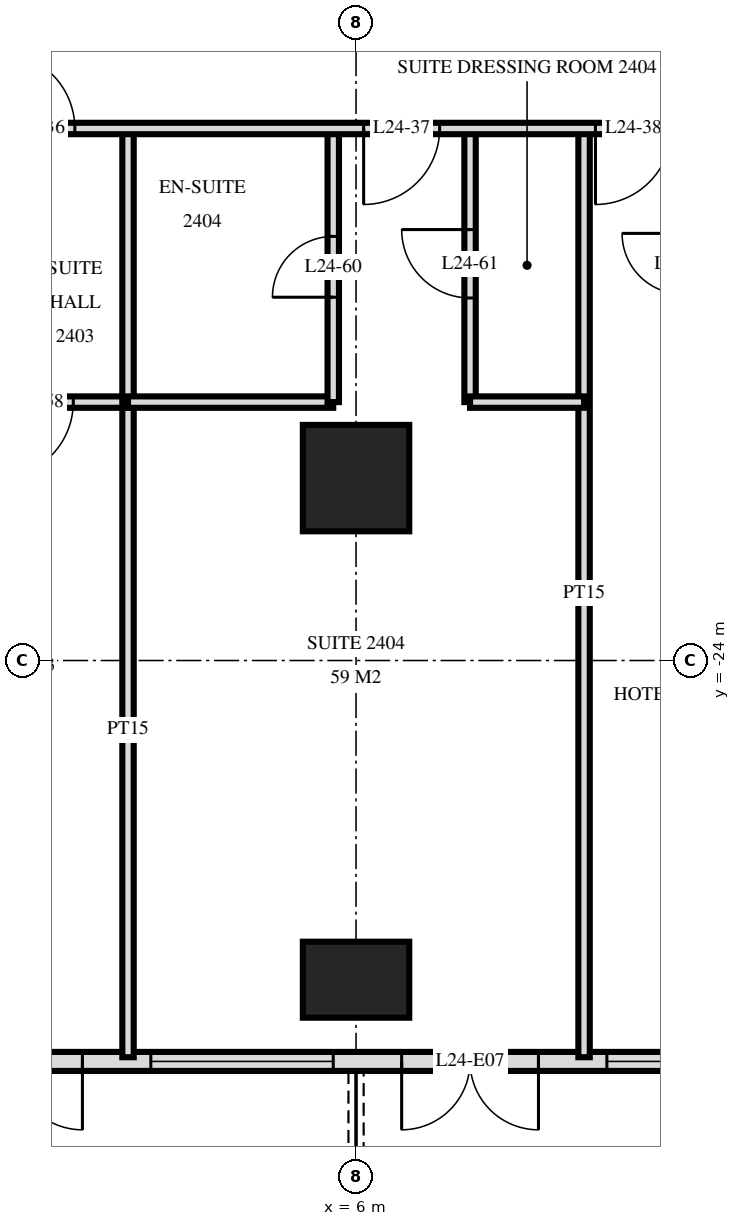
"""IFC4 building model, lengths in metres.
Left out: names, types, materials, properties, quantities, classifications, styles, units other than length and angle.
Written with IfcOpenShell. Run it as: python <this file> out.ifc"""

import sys

from ifc_helpers import new_model, si_unit, direction, frame, frame_2d, origin, origin_2d, place, context, subcontext, project, spatial, rectangle, extrude, element, fill, save


model = new_model("IFC4")
c1 = context("Model", 3, precision=1e-05, world=origin(), true_north=direction((0.0, 1.0)))
c2 = subcontext(c1, "Body", "Model", "MODEL_VIEW")
j1 = project(units=[si_unit("LENGTHUNIT", "METRE"), si_unit("PLANEANGLEUNIT", "RADIAN")], contexts=[c1])
p1 = place(None, origin())
s1 = spatial("IfcSite", under=j1, at=p1, CompositionType="ELEMENT")
p2 = place(p1, origin())
s2 = spatial("IfcBuilding", under=s1, at=p2, CompositionType="ELEMENT")
p3 = place(p2, frame((0.0, 0.0, 96.0)))
s3 = spatial("IfcBuildingStorey", under=s2, at=p3, CompositionType="ELEMENT", Elevation=96.0)
p4 = place(p3, frame((6.0, -28.2, 0.0), z_axis=(0.0, 0.0, 1.0), x_axis=(1.0, 0.0, 0.0)))
e1 = element("IfcColumn", 1, at=p4, inside=s3, PredefinedType="COLUMN", context=c2, shape_type="SweptSolid", body=[
    extrude(rectangle(XDim=1.4, YDim=1.0, at=origin_2d()), origin(), (0.0, 0.0, 1.0), 3.6),
])
p5 = place(p3, frame((6.0, -21.6, 0.0), z_axis=(0.0, 0.0, 1.0), x_axis=(1.0, 0.0, 0.0)))
e2 = element("IfcColumn", 2, at=p5, inside=s3, PredefinedType="COLUMN", context=c2, shape_type="SweptSolid", body=[
    extrude(rectangle(XDim=1.4, YDim=1.4, at=origin_2d()), origin(), (0.0, 0.0, 1.0), 3.6),
])
p6 = place(p3, frame((-28.775, -29.275, 0.0), z_axis=(0.0, 0.0, 1.0), x_axis=(1.0, 0.0, 0.0)))
e3 = element("IfcWall", 3, at=p6, inside=s3, PredefinedType="SOLIDWALL", context=c2, shape_type="SweptSolid", body=[
    extrude(rectangle(XDim=57.551, YDim=0.25, at=frame_2d((28.775, 0.0))), origin(), (0.0, 0.0, 1.0), 3.32),
])
p7 = place(p6, frame((0.575, 0.0, 0.0)))
e4 = element("IfcOpeningElement", 4, at=p7, cuts=e3, PredefinedType="OPENING", context=c2, shape_type="SweptSolid", body=[
    extrude(rectangle(XDim=1.8, YDim=2.4, at=frame_2d((0.9, 1.2))), frame((0.0, 0.135, 0.0), z_axis=(0.0, -1.0, 0.0), x_axis=(1.0, 0.0, 0.0)), (0.0, 0.0, 1.0), 0.27),
])
p8 = place(p6, frame((5.075, 0.0, 0.3)))
e5 = element("IfcOpeningElement", 5, at=p8, cuts=e3, PredefinedType="OPENING", context=c2, shape_type="SweptSolid", body=[
    extrude(rectangle(XDim=2.4, YDim=2.1, at=frame_2d((1.2, 1.05))), frame((0.0, 0.135, 0.0), z_axis=(0.0, -1.0, 0.0), x_axis=(1.0, 0.0, 0.0)), (0.0, 0.0, 1.0), 0.27),
])
p9 = place(p6, frame((8.375, 0.0, 0.0)))
e6 = element("IfcOpeningElement", 6, at=p9, cuts=e3, PredefinedType="OPENING", context=c2, shape_type="SweptSolid", body=[
    extrude(rectangle(XDim=1.8, YDim=2.4, at=frame_2d((0.9, 1.2))), frame((0.0, 0.135, 0.0), z_axis=(0.0, -1.0, 0.0), x_axis=(1.0, 0.0, 0.0)), (0.0, 0.0, 1.0), 0.27),
])
p10 = place(p6, frame((11.375, 0.0, 0.0)))
e7 = element("IfcOpeningElement", 7, at=p10, cuts=e3, PredefinedType="OPENING", context=c2, shape_type="SweptSolid", body=[
    extrude(rectangle(XDim=1.8, YDim=2.4, at=frame_2d((0.9, 1.2))), frame((0.0, 0.135, 0.0), z_axis=(0.0, -1.0, 0.0), x_axis=(1.0, 0.0, 0.0)), (0.0, 0.0, 1.0), 0.27),
])
p11 = place(p6, frame((14.075, 0.0, 0.3)))
e8 = element("IfcOpeningElement", 8, at=p11, cuts=e3, PredefinedType="OPENING", context=c2, shape_type="SweptSolid", body=[
    extrude(rectangle(XDim=2.4, YDim=2.1, at=frame_2d((1.2, 1.05))), frame((0.0, 0.135, 0.0), z_axis=(0.0, -1.0, 0.0), x_axis=(1.0, 0.0, 0.0)), (0.0, 0.0, 1.0), 0.27),
])
p12 = place(p6, frame((17.375, 0.0, 0.0)))
e9 = element("IfcOpeningElement", 9, at=p12, cuts=e3, PredefinedType="OPENING", context=c2, shape_type="SweptSolid", body=[
    extrude(rectangle(XDim=1.8, YDim=2.4, at=frame_2d((0.9, 1.2))), frame((0.0, 0.135, 0.0), z_axis=(0.0, -1.0, 0.0), x_axis=(1.0, 0.0, 0.0)), (0.0, 0.0, 1.0), 0.27),
])
p13 = place(p6, frame((20.075, 0.0, 0.3)))
e10 = element("IfcOpeningElement", 10, at=p13, cuts=e3, PredefinedType="OPENING", context=c2, shape_type="SweptSolid", body=[
    extrude(rectangle(XDim=2.4, YDim=2.1, at=frame_2d((1.2, 1.05))), frame((0.0, 0.135, 0.0), z_axis=(0.0, -1.0, 0.0), x_axis=(1.0, 0.0, 0.0)), (0.0, 0.0, 1.0), 0.27),
])
p14 = place(p6, frame((23.075, 0.0, 0.3)))
e11 = element("IfcOpeningElement", 11, at=p14, cuts=e3, PredefinedType="OPENING", context=c2, shape_type="SweptSolid", body=[
    extrude(rectangle(XDim=2.4, YDim=2.1, at=frame_2d((1.2, 1.05))), frame((0.0, 0.135, 0.0), z_axis=(0.0, -1.0, 0.0), x_axis=(1.0, 0.0, 0.0)), (0.0, 0.0, 1.0), 0.27),
])
p15 = place(p6, frame((26.375, 0.0, 0.0)))
e12 = element("IfcOpeningElement", 12, at=p15, cuts=e3, PredefinedType="OPENING", context=c2, shape_type="SweptSolid", body=[
    extrude(rectangle(XDim=1.8, YDim=2.4, at=frame_2d((0.9, 1.2))), frame((0.0, 0.135, 0.0), z_axis=(0.0, -1.0, 0.0), x_axis=(1.0, 0.0, 0.0)), (0.0, 0.0, 1.0), 0.27),
])
p16 = place(p6, frame((29.375, 0.0, 0.0)))
e13 = element("IfcOpeningElement", 13, at=p16, cuts=e3, PredefinedType="OPENING", context=c2, shape_type="SweptSolid", body=[
    extrude(rectangle(XDim=1.8, YDim=2.4, at=frame_2d((0.9, 1.2))), frame((0.0, 0.135, 0.0), z_axis=(0.0, -1.0, 0.0), x_axis=(1.0, 0.0, 0.0)), (0.0, 0.0, 1.0), 0.27),
])
p17 = place(p6, frame((32.075, 0.0, 0.3)))
e14 = element("IfcOpeningElement", 14, at=p17, cuts=e3, PredefinedType="OPENING", context=c2, shape_type="SweptSolid", body=[
    extrude(rectangle(XDim=2.4, YDim=2.1, at=frame_2d((1.2, 1.05))), frame((0.0, 0.135, 0.0), z_axis=(0.0, -1.0, 0.0), x_axis=(1.0, 0.0, 0.0)), (0.0, 0.0, 1.0), 0.27),
])
p18 = place(p6, frame((35.375, 0.0, 0.0)))
e15 = element("IfcOpeningElement", 15, at=p18, cuts=e3, PredefinedType="OPENING", context=c2, shape_type="SweptSolid", body=[
    extrude(rectangle(XDim=1.8, YDim=2.4, at=frame_2d((0.9, 1.2))), frame((0.0, 0.135, 0.0), z_axis=(0.0, -1.0, 0.0), x_axis=(1.0, 0.0, 0.0)), (0.0, 0.0, 1.0), 0.27),
])
p19 = place(p6, frame((38.075, 0.0, 0.3)))
e16 = element("IfcOpeningElement", 16, at=p19, cuts=e3, PredefinedType="OPENING", context=c2, shape_type="SweptSolid", body=[
    extrude(rectangle(XDim=2.4, YDim=2.1, at=frame_2d((1.2, 1.05))), frame((0.0, 0.135, 0.0), z_axis=(0.0, -1.0, 0.0), x_axis=(1.0, 0.0, 0.0)), (0.0, 0.0, 1.0), 0.27),
])
p20 = place(p6, frame((41.075, 0.0, 0.3)))
e17 = element("IfcOpeningElement", 17, at=p20, cuts=e3, PredefinedType="OPENING", context=c2, shape_type="SweptSolid", body=[
    extrude(rectangle(XDim=2.4, YDim=2.1, at=frame_2d((1.2, 1.05))), frame((0.0, 0.135, 0.0), z_axis=(0.0, -1.0, 0.0), x_axis=(1.0, 0.0, 0.0)), (0.0, 0.0, 1.0), 0.27),
])
p21 = place(p6, frame((44.375, 0.0, 0.0)))
e18 = element("IfcOpeningElement", 18, at=p21, cuts=e3, PredefinedType="OPENING", context=c2, shape_type="SweptSolid", body=[
    extrude(rectangle(XDim=1.8, YDim=2.4, at=frame_2d((0.9, 1.2))), frame((0.0, 0.135, 0.0), z_axis=(0.0, -1.0, 0.0), x_axis=(1.0, 0.0, 0.0)), (0.0, 0.0, 1.0), 0.27),
])
p22 = place(p6, frame((47.075, 0.0, 0.3)))
e19 = element("IfcOpeningElement", 19, at=p22, cuts=e3, PredefinedType="OPENING", context=c2, shape_type="SweptSolid", body=[
    extrude(rectangle(XDim=2.4, YDim=2.1, at=frame_2d((1.2, 1.05))), frame((0.0, 0.135, 0.0), z_axis=(0.0, -1.0, 0.0), x_axis=(1.0, 0.0, 0.0)), (0.0, 0.0, 1.0), 0.27),
])
p23 = place(p6, frame((50.375, 0.0, 0.0)))
e20 = element("IfcOpeningElement", 20, at=p23, cuts=e3, PredefinedType="OPENING", context=c2, shape_type="SweptSolid", body=[
    extrude(rectangle(XDim=1.8, YDim=2.4, at=frame_2d((0.9, 1.2))), frame((0.0, 0.135, 0.0), z_axis=(0.0, -1.0, 0.0), x_axis=(1.0, 0.0, 0.0)), (0.0, 0.0, 1.0), 0.27),
])
p24 = place(p6, frame((53.375, 0.0, 0.0)))
e21 = element("IfcOpeningElement", 21, at=p24, cuts=e3, PredefinedType="OPENING", context=c2, shape_type="SweptSolid", body=[
    extrude(rectangle(XDim=1.8, YDim=2.4, at=frame_2d((0.9, 1.2))), frame((0.0, 0.135, 0.0), z_axis=(0.0, -1.0, 0.0), x_axis=(1.0, 0.0, 0.0)), (0.0, 0.0, 1.0), 0.27),
])
p25 = place(p3, frame((9.0, -29.22, 0.0), z_axis=(0.0, 0.0, 1.0), x_axis=(0.0, 1.0, 0.0)))
e22 = element("IfcWall", 22, at=p25, inside=s3, PredefinedType="PARTITIONING", context=c2, shape_type="SweptSolid", body=[
    extrude(rectangle(XDim=12.22, YDim=0.15, at=frame_2d((6.11, 0.0))), origin(), (0.0, 0.0, 1.0), 3.32),
])
p26 = place(p3, frame((7.5, -20.6, 0.0), z_axis=(0.0, 0.0, 1.0), x_axis=(0.0, 1.0, 0.0)))
e23 = element("IfcWall", 23, at=p26, inside=s3, PredefinedType="PARTITIONING", context=c2, shape_type="SweptSolid", body=[
    extrude(rectangle(XDim=3.6, YDim=0.15, at=frame_2d((1.8, 0.0))), origin(), (0.0, 0.0, 1.0), 3.32),
])
p27 = place(p26, frame((1.37, 0.0, 0.0)))
e24 = element("IfcOpeningElement", 24, at=p27, cuts=e23, PredefinedType="OPENING", context=c2, shape_type="SweptSolid", body=[
    extrude(rectangle(XDim=0.9, YDim=2.1, at=frame_2d((0.45, 1.05))), frame((0.0, 0.085, 0.0), z_axis=(0.0, -1.0, 0.0), x_axis=(1.0, 0.0, 0.0)), (0.0, 0.0, 1.0), 0.17),
])
p28 = place(p3, frame((5.7, -20.6, 0.0), z_axis=(0.0, 0.0, 1.0), x_axis=(0.0, 1.0, 0.0)))
e25 = element("IfcWall", 25, at=p28, inside=s3, PredefinedType="PARTITIONING", context=c2, shape_type="SweptSolid", body=[
    extrude(rectangle(XDim=3.6, YDim=0.15, at=frame_2d((1.8, 0.0))), origin(), (0.0, 0.0, 1.0), 3.32),
])
p29 = place(p28, frame((1.38, 0.0, 0.0)))
e26 = element("IfcOpeningElement", 26, at=p29, cuts=e25, PredefinedType="OPENING", context=c2, shape_type="SweptSolid", body=[
    extrude(rectangle(XDim=0.8, YDim=2.1, at=frame_2d((0.4, 1.05))), frame((0.0, 0.085, 0.0), z_axis=(0.0, -1.0, 0.0), x_axis=(1.0, 0.0, 0.0)), (0.0, 0.0, 1.0), 0.17),
])
p30 = place(p3, frame((3.0, -20.6, 0.0), z_axis=(0.0, 0.0, 1.0), x_axis=(0.0, 1.0, 0.0)))
e27 = element("IfcWall", 27, at=p30, inside=s3, PredefinedType="PARTITIONING", context=c2, shape_type="SweptSolid", body=[
    extrude(rectangle(XDim=3.6, YDim=0.15, at=frame_2d((1.8, 0.0))), origin(), (0.0, 0.0, 1.0), 3.32),
])
p31 = place(p3, frame((3.0, -29.22, 0.0), z_axis=(0.0, 0.0, 1.0), x_axis=(0.0, 1.0, 0.0)))
e28 = element("IfcWall", 28, at=p31, inside=s3, PredefinedType="PARTITIONING", context=c2, shape_type="SweptSolid", body=[
    extrude(rectangle(XDim=8.62, YDim=0.15, at=frame_2d((4.31, 0.0))), origin(), (0.0, 0.0, 1.0), 3.32),
])
p32 = place(p3, frame((0.6, -20.6, 0.0), z_axis=(0.0, 0.0, 1.0), x_axis=(1.0, 0.0, 0.0)))
e29 = element("IfcWall", 29, at=p32, inside=s3, PredefinedType="PARTITIONING", context=c2, shape_type="SweptSolid", body=[
    extrude(rectangle(XDim=2.4, YDim=0.15, at=frame_2d((1.2, 0.0))), origin(), (0.0, 0.0, 1.0), 3.32),
])
p33 = place(p32, frame((0.68, 0.0, 0.0)))
e30 = element("IfcOpeningElement", 30, at=p33, cuts=e29, PredefinedType="OPENING", context=c2, shape_type="SweptSolid", body=[
    extrude(rectangle(XDim=1.0, YDim=2.1, at=frame_2d((0.5, 1.05))), frame((0.0, 0.085, 0.0), z_axis=(0.0, -1.0, 0.0), x_axis=(1.0, 0.0, 0.0)), (0.0, 0.0, 1.0), 0.17),
])
p34 = place(p3, frame((3.0, -20.6, 0.0), z_axis=(0.0, 0.0, 1.0), x_axis=(1.0, 0.0, 0.0)))
e31 = element("IfcWall", 31, at=p34, inside=s3, PredefinedType="PARTITIONING", context=c2, shape_type="SweptSolid", body=[
    extrude(rectangle(XDim=2.7, YDim=0.15, at=frame_2d((1.35, 0.0))), origin(), (0.0, 0.0, 1.0), 3.32),
])
p35 = place(p3, frame((7.5, -20.6, 0.0), z_axis=(0.0, 0.0, 1.0), x_axis=(1.0, 0.0, 0.0)))
e32 = element("IfcWall", 32, at=p35, inside=s3, PredefinedType="PARTITIONING", context=c2, shape_type="SweptSolid", body=[
    extrude(rectangle(XDim=1.5, YDim=0.15, at=frame_2d((0.75, 0.0))), origin(), (0.0, 0.0, 1.0), 3.32),
])
p36 = place(p3, frame((-33.12, -17.0, 0.0), z_axis=(0.0, 0.0, 1.0), x_axis=(1.0, 0.0, 0.0)))
e33 = element("IfcWall", 33, at=p36, inside=s3, PredefinedType="PARTITIONING", context=c2, shape_type="SweptSolid", body=[
    extrude(rectangle(XDim=66.24, YDim=0.15, at=frame_2d((33.12, 0.0))), origin(), (0.0, 0.0, 1.0), 3.32),
])
p37 = place(p36, frame((16.27, 0.0, 0.0)))
e34 = element("IfcOpeningElement", 34, at=p37, cuts=e33, PredefinedType="OPENING", context=c2, shape_type="SweptSolid", body=[
    extrude(rectangle(XDim=1.0, YDim=2.1, at=frame_2d((0.5, 1.05))), frame((0.0, 0.085, 0.0), z_axis=(0.0, -1.0, 0.0), x_axis=(1.0, 0.0, 0.0)), (0.0, 0.0, 1.0), 0.17),
])
p38 = place(p36, frame((22.97, 0.0, 0.0)))
e35 = element("IfcOpeningElement", 35, at=p38, cuts=e33, PredefinedType="OPENING", context=c2, shape_type="SweptSolid", body=[
    extrude(rectangle(XDim=1.0, YDim=2.1, at=frame_2d((0.5, 1.05))), frame((0.0, 0.085, 0.0), z_axis=(0.0, -1.0, 0.0), x_axis=(1.0, 0.0, 0.0)), (0.0, 0.0, 1.0), 0.17),
])
p39 = place(p36, frame((34.42, 0.0, 0.0)))
e36 = element("IfcOpeningElement", 36, at=p39, cuts=e33, PredefinedType="OPENING", context=c2, shape_type="SweptSolid", body=[
    extrude(rectangle(XDim=1.0, YDim=2.1, at=frame_2d((0.5, 1.05))), frame((0.0, 0.085, 0.0), z_axis=(0.0, -1.0, 0.0), x_axis=(1.0, 0.0, 0.0)), (0.0, 0.0, 1.0), 0.17),
])
p40 = place(p36, frame((39.22, 0.0, 0.0)))
e37 = element("IfcOpeningElement", 37, at=p40, cuts=e33, PredefinedType="OPENING", context=c2, shape_type="SweptSolid", body=[
    extrude(rectangle(XDim=1.0, YDim=2.1, at=frame_2d((0.5, 1.05))), frame((0.0, 0.085, 0.0), z_axis=(0.0, -1.0, 0.0), x_axis=(1.0, 0.0, 0.0)), (0.0, 0.0, 1.0), 0.17),
])
p41 = place(p36, frame((42.27, 0.0, 0.0)))
e38 = element("IfcOpeningElement", 38, at=p41, cuts=e33, PredefinedType="OPENING", context=c2, shape_type="SweptSolid", body=[
    extrude(rectangle(XDim=1.0, YDim=2.1, at=frame_2d((0.5, 1.05))), frame((0.0, 0.085, 0.0), z_axis=(0.0, -1.0, 0.0), x_axis=(1.0, 0.0, 0.0)), (0.0, 0.0, 1.0), 0.17),
])
p42 = place(p36, frame((45.82, 0.0, 0.0)))
e39 = element("IfcOpeningElement", 39, at=p42, cuts=e33, PredefinedType="OPENING", context=c2, shape_type="SweptSolid", body=[
    extrude(rectangle(XDim=1.0, YDim=2.1, at=frame_2d((0.5, 1.05))), frame((0.0, 0.085, 0.0), z_axis=(0.0, -1.0, 0.0), x_axis=(1.0, 0.0, 0.0)), (0.0, 0.0, 1.0), 0.17),
])
p43 = place(p36, frame((13.42, 0.0, 0.0)))
e40 = element("IfcOpeningElement", 40, at=p43, cuts=e33, PredefinedType="OPENING", context=c2, shape_type="SweptSolid", body=[
    extrude(rectangle(XDim=1.0, YDim=2.1, at=frame_2d((0.5, 1.05))), frame((0.0, 0.085, 0.0), z_axis=(0.0, -1.0, 0.0), x_axis=(1.0, 0.0, 0.0)), (0.0, 0.0, 1.0), 0.17),
])
p44 = place(p36, frame((54.82, 0.0, 0.0)))
e41 = element("IfcOpeningElement", 41, at=p44, cuts=e33, PredefinedType="OPENING", context=c2, shape_type="SweptSolid", body=[
    extrude(rectangle(XDim=1.0, YDim=2.1, at=frame_2d((0.5, 1.05))), frame((0.0, 0.085, 0.0), z_axis=(0.0, -1.0, 0.0), x_axis=(1.0, 0.0, 0.0)), (0.0, 0.0, 1.0), 0.17),
])
p45 = place(p16, frame((0.9, 0.0, 0.0), z_axis=(0.0, 0.0, 1.0), x_axis=(-1.0, 0.0, 0.0)))
e42 = element("IfcDoor", 42, at=p45, inside=s3, OperationType="DOUBLE_DOOR_SINGLE_SWING", PredefinedType="DOOR", context=c2, shape_type="SweptSolid", body=[
    extrude(rectangle(XDim=1.8, YDim=2.4, at=frame_2d((0.0, 1.2))), frame((0.0, -0.025, 0.0), z_axis=(0.0, 1.0, 0.0), x_axis=(-1.0, 0.0, 0.0)), (0.0, 0.0, 1.0), 0.05),
])
fill(e13, e42)
p46 = place(p17, origin())
e43 = element("IfcWindow", 43, at=p46, inside=s3, PartitioningType="SINGLE_PANEL", PredefinedType="WINDOW", context=c2, shape_type="SweptSolid", body=[
    extrude(rectangle(XDim=2.4, YDim=2.1, at=frame_2d((1.2, 1.05))), frame((0.0, 0.03, 0.0), z_axis=(0.0, -1.0, 0.0), x_axis=(1.0, 0.0, 0.0)), (0.0, 0.0, 1.0), 0.06),
])
fill(e14, e43)
p47 = place(p18, frame((0.9, 0.0, 0.0), z_axis=(0.0, 0.0, 1.0), x_axis=(-1.0, 0.0, 0.0)))
e44 = element("IfcDoor", 44, at=p47, inside=s3, OperationType="DOUBLE_DOOR_SINGLE_SWING", PredefinedType="DOOR", context=c2, shape_type="SweptSolid", body=[
    extrude(rectangle(XDim=1.8, YDim=2.4, at=frame_2d((0.0, 1.2))), frame((0.0, -0.025, 0.0), z_axis=(0.0, 1.0, 0.0), x_axis=(-1.0, 0.0, 0.0)), (0.0, 0.0, 1.0), 0.05),
])
fill(e15, e44)
p48 = place(p19, origin())
e45 = element("IfcWindow", 45, at=p48, inside=s3, PartitioningType="SINGLE_PANEL", PredefinedType="WINDOW", context=c2, shape_type="SweptSolid", body=[
    extrude(rectangle(XDim=2.4, YDim=2.1, at=frame_2d((1.2, 1.05))), frame((0.0, 0.03, 0.0), z_axis=(0.0, -1.0, 0.0), x_axis=(1.0, 0.0, 0.0)), (0.0, 0.0, 1.0), 0.06),
])
fill(e16, e45)
p49 = place(p39, origin())
e46 = element("IfcDoor", 46, at=p49, inside=s3, OperationType="SINGLE_SWING_RIGHT", PredefinedType="DOOR", context=c2, shape_type="SweptSolid", body=[
    extrude(rectangle(XDim=1.0, YDim=2.1, at=frame_2d((0.5, 1.05))), frame((0.0, 0.025, 0.0), z_axis=(0.0, -1.0, 0.0), x_axis=(1.0, 0.0, 0.0)), (0.0, 0.0, 1.0), 0.05),
])
fill(e36, e46)
p50 = place(p40, frame((0.5, 0.0, 0.0), z_axis=(0.0, 0.0, 1.0), x_axis=(-1.0, 0.0, 0.0)))
e47 = element("IfcDoor", 47, at=p50, inside=s3, OperationType="SINGLE_SWING_LEFT", PredefinedType="DOOR", context=c2, shape_type="SweptSolid", body=[
    extrude(rectangle(XDim=1.0, YDim=2.1, at=frame_2d((0.0, 1.05))), frame((0.0, -0.025, 0.0), z_axis=(0.0, 1.0, 0.0), x_axis=(-1.0, 0.0, 0.0)), (0.0, 0.0, 1.0), 0.05),
])
fill(e37, e47)
p51 = place(p41, frame((0.5, 0.0, 0.0), z_axis=(0.0, 0.0, 1.0), x_axis=(-1.0, 0.0, 0.0)))
e48 = element("IfcDoor", 48, at=p51, inside=s3, OperationType="SINGLE_SWING_LEFT", PredefinedType="DOOR", context=c2, shape_type="SweptSolid", body=[
    extrude(rectangle(XDim=1.0, YDim=2.1, at=frame_2d((0.0, 1.05))), frame((0.0, -0.025, 0.0), z_axis=(0.0, 1.0, 0.0), x_axis=(-1.0, 0.0, 0.0)), (0.0, 0.0, 1.0), 0.05),
])
fill(e38, e48)
p52 = place(p33, frame((0.5, 0.0, 0.0), z_axis=(0.0, 0.0, 1.0), x_axis=(-1.0, 0.0, 0.0)))
e49 = element("IfcDoor", 49, at=p52, inside=s3, OperationType="SINGLE_SWING_LEFT", PredefinedType="DOOR", context=c2, shape_type="SweptSolid", body=[
    extrude(rectangle(XDim=1.0, YDim=2.1, at=frame_2d((0.0, 1.05))), frame((0.0, -0.025, 0.0), z_axis=(0.0, 1.0, 0.0), x_axis=(-1.0, 0.0, 0.0)), (0.0, 0.0, 1.0), 0.05),
])
fill(e30, e49)
p53 = place(p29, origin())
e50 = element("IfcDoor", 50, at=p53, inside=s3, OperationType="SINGLE_SWING_RIGHT", PredefinedType="DOOR", context=c2, shape_type="SweptSolid", body=[
    extrude(rectangle(XDim=0.8, YDim=2.1, at=frame_2d((0.4, 1.05))), frame((0.0, 0.025, 0.0), z_axis=(0.0, -1.0, 0.0), x_axis=(1.0, 0.0, 0.0)), (0.0, 0.0, 1.0), 0.05),
])
fill(e26, e50)
p54 = place(p27, origin())
e51 = element("IfcDoor", 51, at=p54, inside=s3, OperationType="SINGLE_SWING_LEFT", PredefinedType="DOOR", context=c2, shape_type="SweptSolid", body=[
    extrude(rectangle(XDim=0.9, YDim=2.1, at=frame_2d((0.45, 1.05))), frame((0.0, 0.025, 0.0), z_axis=(0.0, -1.0, 0.0), x_axis=(1.0, 0.0, 0.0)), (0.0, 0.0, 1.0), 0.05),
])
fill(e24, e51)
save(model, sys.argv[1])
